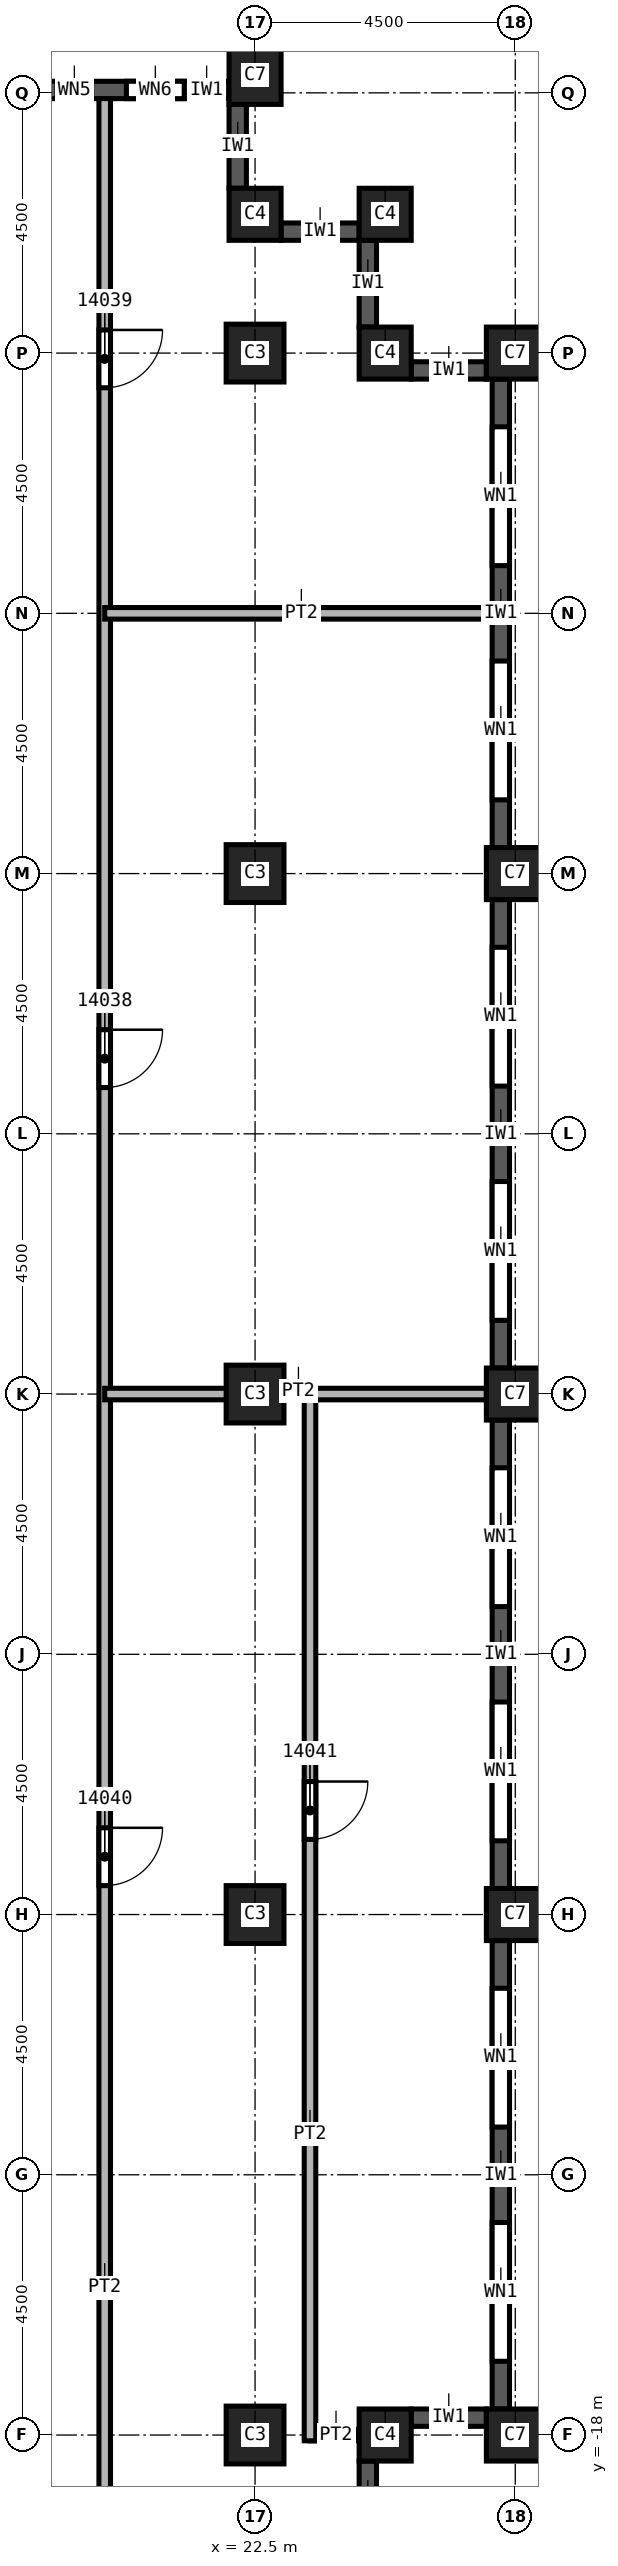
"""IFC4 building model, lengths in metres.
Left out: names, types, materials, properties, quantities, classifications, styles, units other than length and angle.
Written with IfcOpenShell. Run it as: python <this file> out.ifc"""

import sys

from ifc_helpers import new_model, si_unit, direction, frame, frame_2d, origin, origin_2d, place, context, subcontext, project, spatial, rectangle, extrude, element, fill, save


model = new_model("IFC4")
c1 = context("Model", 3, precision=1e-05, world=origin(), true_north=direction((0.0, 1.0)))
c2 = subcontext(c1, "Body", "Model", "MODEL_VIEW")
j1 = project(units=[si_unit("LENGTHUNIT", "METRE"), si_unit("PLANEANGLEUNIT", "RADIAN")], contexts=[c1])
p1 = place(None, origin())
s1 = spatial("IfcSite", under=j1, at=p1, CompositionType="ELEMENT")
p2 = place(p1, origin())
s2 = spatial("IfcBuilding", under=s1, at=p2, CompositionType="ELEMENT")
p3 = place(p2, frame((0.0, 0.0, 224.0)))
s3 = spatial("IfcBuildingStorey", under=s2, at=p3, CompositionType="ELEMENT", Elevation=224.0)
for number, where, z_axis, x_axis in (
    (1, (22.5, 0.0, 0.0), (0.0, 0.0, 1.0), (1.0, 0.0, 0.0)),
    (2, (22.5, 9.0, 0.0), (0.0, 0.0, 1.0), (1.0, 0.0, 0.0)),
    (3, (22.5, 18.0, 0.0), (0.0, 0.0, 1.0), (1.0, 0.0, 0.0)),
    (4, (22.5, -9.0, 0.0), (0.0, 0.0, 1.0), (1.0, 0.0, 0.0)),
    (5, (22.5, -18.0, 0.0), (0.0, 0.0, 1.0), (1.0, 0.0, 0.0)),
):
    element("IfcColumn", number, at=place(p3, frame(where, z_axis=z_axis, x_axis=x_axis)), inside=s3, PredefinedType="COLUMN", context=c2, shape_type="SweptSolid", body=[
        extrude(rectangle(XDim=1.0, YDim=1.0, at=origin_2d()), origin(), (0.0, 0.0, 1.0), 3.72),
    ])
for number, where, z_axis, x_axis in (
    (6, (27.0, 0.0, 0.0), (0.0, 0.0, 1.0), (0.0, 1.0, 0.0)),
    (7, (27.0, 9.0, 0.0), (0.0, 0.0, 1.0), (0.0, 1.0, 0.0)),
    (8, (27.0, 18.0, 0.0), (0.0, 0.0, 1.0), (0.0, 1.0, 0.0)),
    (9, (27.0, -9.0, 0.0), (0.0, 0.0, 1.0), (0.0, 1.0, 0.0)),
    (10, (27.0, -18.0, 0.0), (0.0, 0.0, 1.0), (0.0, 1.0, 0.0)),
    (11, (22.5, 22.8, 0.0), (0.0, 0.0, 1.0), (1.0, 0.0, 0.0)),
):
    element("IfcColumn", number, at=place(p3, frame(where, z_axis=z_axis, x_axis=x_axis)), inside=s3, PredefinedType="COLUMN", context=c2, shape_type="SweptSolid", body=[
        extrude(rectangle(XDim=0.9, YDim=1.0, at=origin_2d()), origin(), (0.0, 0.0, 1.0), 3.72),
    ])
for number, where, z_axis, x_axis in (
    (12, (22.5, 20.4, 0.0), (0.0, 0.0, 1.0), (1.0, 0.0, 0.0)),
    (13, (24.75, 20.4, 0.0), (0.0, 0.0, 1.0), (1.0, 0.0, 0.0)),
    (14, (24.75, 18.0, 0.0), (0.0, 0.0, 1.0), (1.0, 0.0, 0.0)),
    (15, (24.75, -18.0, 0.0), (0.0, 0.0, 1.0), (1.0, 0.0, 0.0)),
):
    element("IfcColumn", number, at=place(p3, frame(where, z_axis=z_axis, x_axis=x_axis)), inside=s3, PredefinedType="COLUMN", context=c2, shape_type="SweptSolid", body=[
        extrude(rectangle(XDim=0.9, YDim=0.9, at=origin_2d()), origin(), (0.0, 0.0, 1.0), 3.72),
    ])
p4 = place(p3, frame((24.45, -19.95, 0.0), z_axis=(0.0, 0.0, 1.0), x_axis=(0.0, 1.0, 0.0)))
e16 = element("IfcWall", 16, at=p4, inside=s3, PredefinedType="SOLIDWALL", context=c2, shape_type="SweptSolid", body=[
    extrude(rectangle(XDim=1.5, YDim=0.3, at=frame_2d((0.75, 0.0))), origin(), (0.0, 0.0, 1.0), 3.12),
])
p5 = place(p3, frame((25.2, -17.7, 0.0), z_axis=(0.0, 0.0, 1.0), x_axis=(1.0, 0.0, 0.0)))
e17 = element("IfcWall", 17, at=p5, inside=s3, PredefinedType="SOLIDWALL", context=c2, shape_type="SweptSolid", body=[
    extrude(rectangle(XDim=1.3, YDim=0.3, at=frame_2d((0.65, 0.0))), origin(), (0.0, 0.0, 1.0), 3.12),
])
p6 = place(p3, frame((26.75, -17.55, 0.0), z_axis=(0.0, 0.0, 1.0), x_axis=(0.0, 1.0, 0.0)))
e18 = element("IfcWall", 18, at=p6, inside=s3, PredefinedType="SOLIDWALL", context=c2, shape_type="SweptSolid", body=[
    extrude(rectangle(XDim=8.1, YDim=0.3, at=frame_2d((4.05, 0.0))), origin(), (0.0, 0.0, 1.0), 3.12),
])
p7 = place(p6, frame((0.825, 0.0, 0.8)))
e19 = element("IfcOpeningElement", 19, at=p7, cuts=e18, PredefinedType="OPENING", context=c2, shape_type="SweptSolid", body=[
    extrude(rectangle(XDim=2.4, YDim=1.95, at=frame_2d((1.2, 0.975))), frame((0.0, 0.15, 0.0), z_axis=(0.0, -1.0, 0.0), x_axis=(1.0, 0.0, 0.0)), (0.0, 0.0, 1.0), 0.3),
])
p8 = place(p6, frame((4.875, 0.0, 0.8)))
e20 = element("IfcOpeningElement", 20, at=p8, cuts=e18, PredefinedType="OPENING", context=c2, shape_type="SweptSolid", body=[
    extrude(rectangle(XDim=2.4, YDim=1.95, at=frame_2d((1.2, 0.975))), frame((0.0, 0.15, 0.0), z_axis=(0.0, -1.0, 0.0), x_axis=(1.0, 0.0, 0.0)), (0.0, 0.0, 1.0), 0.3),
])
p9 = place(p3, frame((26.75, -8.55, 0.0), z_axis=(0.0, 0.0, 1.0), x_axis=(0.0, 1.0, 0.0)))
e21 = element("IfcWall", 21, at=p9, inside=s3, PredefinedType="SOLIDWALL", context=c2, shape_type="SweptSolid", body=[
    extrude(rectangle(XDim=8.1, YDim=0.3, at=frame_2d((4.05, 0.0))), origin(), (0.0, 0.0, 1.0), 3.12),
])
p10 = place(p9, frame((0.825, 0.0, 0.8)))
e22 = element("IfcOpeningElement", 22, at=p10, cuts=e21, PredefinedType="OPENING", context=c2, shape_type="SweptSolid", body=[
    extrude(rectangle(XDim=2.4, YDim=1.95, at=frame_2d((1.2, 0.975))), frame((0.0, 0.15, 0.0), z_axis=(0.0, -1.0, 0.0), x_axis=(1.0, 0.0, 0.0)), (0.0, 0.0, 1.0), 0.3),
])
p11 = place(p9, frame((4.875, 0.0, 0.8)))
e23 = element("IfcOpeningElement", 23, at=p11, cuts=e21, PredefinedType="OPENING", context=c2, shape_type="SweptSolid", body=[
    extrude(rectangle(XDim=2.4, YDim=1.95, at=frame_2d((1.2, 0.975))), frame((0.0, 0.15, 0.0), z_axis=(0.0, -1.0, 0.0), x_axis=(1.0, 0.0, 0.0)), (0.0, 0.0, 1.0), 0.3),
])
p12 = place(p3, frame((26.75, 0.45, 0.0), z_axis=(0.0, 0.0, 1.0), x_axis=(0.0, 1.0, 0.0)))
e24 = element("IfcWall", 24, at=p12, inside=s3, PredefinedType="SOLIDWALL", context=c2, shape_type="SweptSolid", body=[
    extrude(rectangle(XDim=8.1, YDim=0.3, at=frame_2d((4.05, 0.0))), origin(), (0.0, 0.0, 1.0), 3.12),
])
p13 = place(p12, frame((0.825, 0.0, 0.8)))
e25 = element("IfcOpeningElement", 25, at=p13, cuts=e24, PredefinedType="OPENING", context=c2, shape_type="SweptSolid", body=[
    extrude(rectangle(XDim=2.4, YDim=1.95, at=frame_2d((1.2, 0.975))), frame((0.0, 0.15, 0.0), z_axis=(0.0, -1.0, 0.0), x_axis=(1.0, 0.0, 0.0)), (0.0, 0.0, 1.0), 0.3),
])
p14 = place(p12, frame((4.875, 0.0, 0.8)))
e26 = element("IfcOpeningElement", 26, at=p14, cuts=e24, PredefinedType="OPENING", context=c2, shape_type="SweptSolid", body=[
    extrude(rectangle(XDim=2.4, YDim=1.95, at=frame_2d((1.2, 0.975))), frame((0.0, 0.15, 0.0), z_axis=(0.0, -1.0, 0.0), x_axis=(1.0, 0.0, 0.0)), (0.0, 0.0, 1.0), 0.3),
])
p15 = place(p3, frame((26.75, 9.45, 0.0), z_axis=(0.0, 0.0, 1.0), x_axis=(0.0, 1.0, 0.0)))
e27 = element("IfcWall", 27, at=p15, inside=s3, PredefinedType="SOLIDWALL", context=c2, shape_type="SweptSolid", body=[
    extrude(rectangle(XDim=8.1, YDim=0.3, at=frame_2d((4.05, 0.0))), origin(), (0.0, 0.0, 1.0), 3.12),
])
p16 = place(p15, frame((0.825, 0.0, 0.8)))
e28 = element("IfcOpeningElement", 28, at=p16, cuts=e27, PredefinedType="OPENING", context=c2, shape_type="SweptSolid", body=[
    extrude(rectangle(XDim=2.4, YDim=1.95, at=frame_2d((1.2, 0.975))), frame((0.0, 0.15, 0.0), z_axis=(0.0, -1.0, 0.0), x_axis=(1.0, 0.0, 0.0)), (0.0, 0.0, 1.0), 0.3),
])
p17 = place(p15, frame((4.875, 0.0, 0.8)))
e29 = element("IfcOpeningElement", 29, at=p17, cuts=e27, PredefinedType="OPENING", context=c2, shape_type="SweptSolid", body=[
    extrude(rectangle(XDim=2.4, YDim=1.95, at=frame_2d((1.2, 0.975))), frame((0.0, 0.15, 0.0), z_axis=(0.0, -1.0, 0.0), x_axis=(1.0, 0.0, 0.0)), (0.0, 0.0, 1.0), 0.3),
])
p18 = place(p3, frame((26.5, 17.7, 0.0), z_axis=(0.0, 0.0, 1.0), x_axis=(-1.0, 0.0, 0.0)))
e30 = element("IfcWall", 30, at=p18, inside=s3, PredefinedType="SOLIDWALL", context=c2, shape_type="SweptSolid", body=[
    extrude(rectangle(XDim=1.3, YDim=0.3, at=frame_2d((0.65, 0.0))), origin(), (0.0, 0.0, 1.0), 3.12),
])
p19 = place(p3, frame((24.45, 18.45, 0.0), z_axis=(0.0, 0.0, 1.0), x_axis=(0.0, 1.0, 0.0)))
e31 = element("IfcWall", 31, at=p19, inside=s3, PredefinedType="SOLIDWALL", context=c2, shape_type="SweptSolid", body=[
    extrude(rectangle(XDim=1.5, YDim=0.3, at=frame_2d((0.75, 0.0))), origin(), (0.0, 0.0, 1.0), 3.12),
])
p20 = place(p3, frame((24.3, 20.1, 0.0), z_axis=(0.0, 0.0, 1.0), x_axis=(-1.0, 0.0, 0.0)))
e32 = element("IfcWall", 32, at=p20, inside=s3, PredefinedType="SOLIDWALL", context=c2, shape_type="SweptSolid", body=[
    extrude(rectangle(XDim=1.35, YDim=0.3, at=frame_2d((0.675, 0.0))), origin(), (0.0, 0.0, 1.0), 3.12),
])
p21 = place(p3, frame((22.2, 20.85, 0.0), z_axis=(0.0, 0.0, 1.0), x_axis=(0.0, 1.0, 0.0)))
e33 = element("IfcWall", 33, at=p21, inside=s3, PredefinedType="SOLIDWALL", context=c2, shape_type="SweptSolid", body=[
    extrude(rectangle(XDim=1.45, YDim=0.3, at=frame_2d((0.725, 0.0))), origin(), (0.0, 0.0, 1.0), 3.12),
])
p22 = place(p3, frame((22.05, 22.55, 0.0), z_axis=(0.0, 0.0, 1.0), x_axis=(-1.0, 0.0, 0.0)))
e34 = element("IfcWall", 34, at=p22, inside=s3, PredefinedType="SOLIDWALL", context=c2, shape_type="SweptSolid", body=[
    extrude(rectangle(XDim=3.6, YDim=0.3, at=frame_2d((1.8, 0.0))), origin(), (0.0, 0.0, 1.0), 3.12),
])
p23 = place(p22, frame((0.775, 0.0, 0.8)))
e35 = element("IfcOpeningElement", 35, at=p23, cuts=e34, PredefinedType="OPENING", context=c2, shape_type="SweptSolid", body=[
    extrude(rectangle(XDim=1.0, YDim=1.95, at=frame_2d((0.5, 0.975))), frame((0.0, 0.15, 0.0), z_axis=(0.0, -1.0, 0.0), x_axis=(1.0, 0.0, 0.0)), (0.0, 0.0, 1.0), 0.3),
])
p24 = place(p22, frame((2.375, 0.0, 0.8)))
e36 = element("IfcOpeningElement", 36, at=p24, cuts=e34, PredefinedType="OPENING", context=c2, shape_type="SweptSolid", body=[
    extrude(rectangle(XDim=0.6, YDim=1.95, at=frame_2d((0.3, 0.975))), frame((0.0, 0.15, 0.0), z_axis=(0.0, -1.0, 0.0), x_axis=(1.0, 0.0, 0.0)), (0.0, 0.0, 1.0), 0.3),
])
p25 = place(p3, frame((19.9, 22.4, 0.0), z_axis=(0.0, 0.0, 1.0), x_axis=(0.0, -1.0, 0.0)))
e37 = element("IfcWall", 37, at=p25, inside=s3, PredefinedType="PARTITIONING", context=c2, shape_type="SweptSolid", body=[
    extrude(rectangle(XDim=44.8, YDim=0.2, at=frame_2d((22.4, 0.0))), origin(), (0.0, 0.0, 1.0), 3.72),
])
p26 = place(p25, frame((16.1, 0.0, 0.0)))
e38 = element("IfcOpeningElement", 38, at=p26, cuts=e37, PredefinedType="OPENING", context=c2, shape_type="SweptSolid", body=[
    extrude(rectangle(XDim=1.0, YDim=2.1, at=frame_2d((0.5, 1.05))), frame((0.0, 0.1, 0.0), z_axis=(0.0, -1.0, 0.0), x_axis=(1.0, 0.0, 0.0)), (0.0, 0.0, 1.0), 0.2),
])
p27 = place(p25, frame((4.0, 0.0, 0.0)))
e39 = element("IfcOpeningElement", 39, at=p27, cuts=e37, PredefinedType="OPENING", context=c2, shape_type="SweptSolid", body=[
    extrude(rectangle(XDim=1.0, YDim=2.1, at=frame_2d((0.5, 1.05))), frame((0.0, 0.1, 0.0), z_axis=(0.0, -1.0, 0.0), x_axis=(1.0, 0.0, 0.0)), (0.0, 0.0, 1.0), 0.2),
])
p28 = place(p25, frame((29.9, 0.0, 0.0)))
e40 = element("IfcOpeningElement", 40, at=p28, cuts=e37, PredefinedType="OPENING", context=c2, shape_type="SweptSolid", body=[
    extrude(rectangle(XDim=1.0, YDim=2.1, at=frame_2d((0.5, 1.05))), frame((0.0, 0.1, 0.0), z_axis=(0.0, -1.0, 0.0), x_axis=(1.0, 0.0, 0.0)), (0.0, 0.0, 1.0), 0.2),
])
p29 = place(p3, frame((19.9, 13.5, 0.0), z_axis=(0.0, 0.0, 1.0), x_axis=(1.0, 0.0, 0.0)))
e41 = element("IfcWall", 41, at=p29, inside=s3, PredefinedType="PARTITIONING", context=c2, shape_type="SweptSolid", body=[
    extrude(rectangle(XDim=6.7, YDim=0.2, at=frame_2d((3.35, 0.0))), origin(), (0.0, 0.0, 1.0), 3.72),
])
p30 = place(p3, frame((23.45, -18.0, 0.0), z_axis=(0.0, 0.0, 1.0), x_axis=(1.0, 0.0, 0.0)))
e42 = element("IfcWall", 42, at=p30, inside=s3, PredefinedType="PARTITIONING", context=c2, shape_type="SweptSolid", body=[
    extrude(rectangle(XDim=0.8, YDim=0.2, at=frame_2d((0.4, 0.0))), origin(), (0.0, 0.0, 1.0), 3.72),
])
p31 = place(p3, frame((23.45, 0.0, 0.0), z_axis=(0.0, 0.0, 1.0), x_axis=(0.0, -1.0, 0.0)))
e43 = element("IfcWall", 43, at=p31, inside=s3, PredefinedType="PARTITIONING", context=c2, shape_type="SweptSolid", body=[
    extrude(rectangle(XDim=18.1, YDim=0.2, at=frame_2d((9.05, 0.0))), origin(), (0.0, 0.0, 1.0), 3.72),
])
p32 = place(p31, frame((6.7, 0.0, 0.0)))
e44 = element("IfcOpeningElement", 44, at=p32, cuts=e43, PredefinedType="OPENING", context=c2, shape_type="SweptSolid", body=[
    extrude(rectangle(XDim=1.0, YDim=2.1, at=frame_2d((0.5, 1.05))), frame((0.0, 0.1, 0.0), z_axis=(0.0, -1.0, 0.0), x_axis=(1.0, 0.0, 0.0)), (0.0, 0.0, 1.0), 0.2),
])
p33 = place(p3, frame((26.5, 0.0, 0.0), z_axis=(0.0, 0.0, 1.0), x_axis=(-1.0, 0.0, 0.0)))
e45 = element("IfcWall", 45, at=p33, inside=s3, PredefinedType="PARTITIONING", context=c2, shape_type="SweptSolid", body=[
    extrude(rectangle(XDim=6.6, YDim=0.2, at=frame_2d((3.3, 0.0))), origin(), (0.0, 0.0, 1.0), 3.72),
])
p34 = place(p7, origin())
e46 = element("IfcWindow", 46, at=p34, inside=s3, PartitioningType="SINGLE_PANEL", PredefinedType="WINDOW", context=c2, shape_type="SweptSolid", body=[
    extrude(rectangle(XDim=2.4, YDim=1.95, at=frame_2d((1.2, 0.975))), frame((0.0, 0.03, 0.0), z_axis=(0.0, -1.0, 0.0), x_axis=(1.0, 0.0, 0.0)), (0.0, 0.0, 1.0), 0.06),
])
fill(e19, e46)
p35 = place(p8, origin())
e47 = element("IfcWindow", 47, at=p35, inside=s3, PartitioningType="SINGLE_PANEL", PredefinedType="WINDOW", context=c2, shape_type="SweptSolid", body=[
    extrude(rectangle(XDim=2.4, YDim=1.95, at=frame_2d((1.2, 0.975))), frame((0.0, 0.03, 0.0), z_axis=(0.0, -1.0, 0.0), x_axis=(1.0, 0.0, 0.0)), (0.0, 0.0, 1.0), 0.06),
])
fill(e20, e47)
p36 = place(p10, origin())
e48 = element("IfcWindow", 48, at=p36, inside=s3, PartitioningType="SINGLE_PANEL", PredefinedType="WINDOW", context=c2, shape_type="SweptSolid", body=[
    extrude(rectangle(XDim=2.4, YDim=1.95, at=frame_2d((1.2, 0.975))), frame((0.0, 0.03, 0.0), z_axis=(0.0, -1.0, 0.0), x_axis=(1.0, 0.0, 0.0)), (0.0, 0.0, 1.0), 0.06),
])
fill(e22, e48)
p37 = place(p11, origin())
e49 = element("IfcWindow", 49, at=p37, inside=s3, PartitioningType="SINGLE_PANEL", PredefinedType="WINDOW", context=c2, shape_type="SweptSolid", body=[
    extrude(rectangle(XDim=2.4, YDim=1.95, at=frame_2d((1.2, 0.975))), frame((0.0, 0.03, 0.0), z_axis=(0.0, -1.0, 0.0), x_axis=(1.0, 0.0, 0.0)), (0.0, 0.0, 1.0), 0.06),
])
fill(e23, e49)
p38 = place(p13, origin())
e50 = element("IfcWindow", 50, at=p38, inside=s3, PartitioningType="SINGLE_PANEL", PredefinedType="WINDOW", context=c2, shape_type="SweptSolid", body=[
    extrude(rectangle(XDim=2.4, YDim=1.95, at=frame_2d((1.2, 0.975))), frame((0.0, 0.03, 0.0), z_axis=(0.0, -1.0, 0.0), x_axis=(1.0, 0.0, 0.0)), (0.0, 0.0, 1.0), 0.06),
])
fill(e25, e50)
p39 = place(p14, origin())
e51 = element("IfcWindow", 51, at=p39, inside=s3, PartitioningType="SINGLE_PANEL", PredefinedType="WINDOW", context=c2, shape_type="SweptSolid", body=[
    extrude(rectangle(XDim=2.4, YDim=1.95, at=frame_2d((1.2, 0.975))), frame((0.0, 0.03, 0.0), z_axis=(0.0, -1.0, 0.0), x_axis=(1.0, 0.0, 0.0)), (0.0, 0.0, 1.0), 0.06),
])
fill(e26, e51)
p40 = place(p16, origin())
e52 = element("IfcWindow", 52, at=p40, inside=s3, PartitioningType="SINGLE_PANEL", PredefinedType="WINDOW", context=c2, shape_type="SweptSolid", body=[
    extrude(rectangle(XDim=2.4, YDim=1.95, at=frame_2d((1.2, 0.975))), frame((0.0, 0.03, 0.0), z_axis=(0.0, -1.0, 0.0), x_axis=(1.0, 0.0, 0.0)), (0.0, 0.0, 1.0), 0.06),
])
fill(e28, e52)
p41 = place(p17, origin())
e53 = element("IfcWindow", 53, at=p41, inside=s3, PartitioningType="SINGLE_PANEL", PredefinedType="WINDOW", context=c2, shape_type="SweptSolid", body=[
    extrude(rectangle(XDim=2.4, YDim=1.95, at=frame_2d((1.2, 0.975))), frame((0.0, 0.03, 0.0), z_axis=(0.0, -1.0, 0.0), x_axis=(1.0, 0.0, 0.0)), (0.0, 0.0, 1.0), 0.06),
])
fill(e29, e53)
p42 = place(p26, origin())
e54 = element("IfcDoor", 54, at=p42, inside=s3, OperationType="SINGLE_SWING_LEFT", PredefinedType="DOOR", context=c2, shape_type="SweptSolid", body=[
    extrude(rectangle(XDim=1.0, YDim=2.1, at=frame_2d((0.5, 1.05))), frame((0.0, 0.025, 0.0), z_axis=(0.0, -1.0, 0.0), x_axis=(1.0, 0.0, 0.0)), (0.0, 0.0, 1.0), 0.05),
])
fill(e38, e54)
p43 = place(p27, origin())
e55 = element("IfcDoor", 55, at=p43, inside=s3, OperationType="SINGLE_SWING_RIGHT", PredefinedType="DOOR", context=c2, shape_type="SweptSolid", body=[
    extrude(rectangle(XDim=1.0, YDim=2.1, at=frame_2d((0.5, 1.05))), frame((0.0, 0.025, 0.0), z_axis=(0.0, -1.0, 0.0), x_axis=(1.0, 0.0, 0.0)), (0.0, 0.0, 1.0), 0.05),
])
fill(e39, e55)
p44 = place(p28, origin())
e56 = element("IfcDoor", 56, at=p44, inside=s3, OperationType="SINGLE_SWING_LEFT", PredefinedType="DOOR", context=c2, shape_type="SweptSolid", body=[
    extrude(rectangle(XDim=1.0, YDim=2.1, at=frame_2d((0.5, 1.05))), frame((0.0, 0.025, 0.0), z_axis=(0.0, -1.0, 0.0), x_axis=(1.0, 0.0, 0.0)), (0.0, 0.0, 1.0), 0.05),
])
fill(e40, e56)
p45 = place(p32, origin())
e57 = element("IfcDoor", 57, at=p45, inside=s3, OperationType="SINGLE_SWING_RIGHT", PredefinedType="DOOR", context=c2, shape_type="SweptSolid", body=[
    extrude(rectangle(XDim=1.0, YDim=2.1, at=frame_2d((0.5, 1.05))), frame((0.0, 0.025, 0.0), z_axis=(0.0, -1.0, 0.0), x_axis=(1.0, 0.0, 0.0)), (0.0, 0.0, 1.0), 0.05),
])
fill(e44, e57)
p46 = place(p23, origin())
e58 = element("IfcWindow", 58, at=p46, inside=s3, PartitioningType="SINGLE_PANEL", PredefinedType="WINDOW", context=c2, shape_type="SweptSolid", body=[
    extrude(rectangle(XDim=1.0, YDim=1.95, at=frame_2d((0.5, 0.975))), frame((0.0, 0.03, 0.0), z_axis=(0.0, -1.0, 0.0), x_axis=(1.0, 0.0, 0.0)), (0.0, 0.0, 1.0), 0.06),
])
fill(e35, e58)
p47 = place(p24, origin())
e59 = element("IfcWindow", 59, at=p47, inside=s3, PartitioningType="SINGLE_PANEL", PredefinedType="WINDOW", context=c2, shape_type="SweptSolid", body=[
    extrude(rectangle(XDim=0.6, YDim=1.95, at=frame_2d((0.3, 0.975))), frame((0.0, 0.03, 0.0), z_axis=(0.0, -1.0, 0.0), x_axis=(1.0, 0.0, 0.0)), (0.0, 0.0, 1.0), 0.06),
])
fill(e36, e59)
save(model, sys.argv[1])
